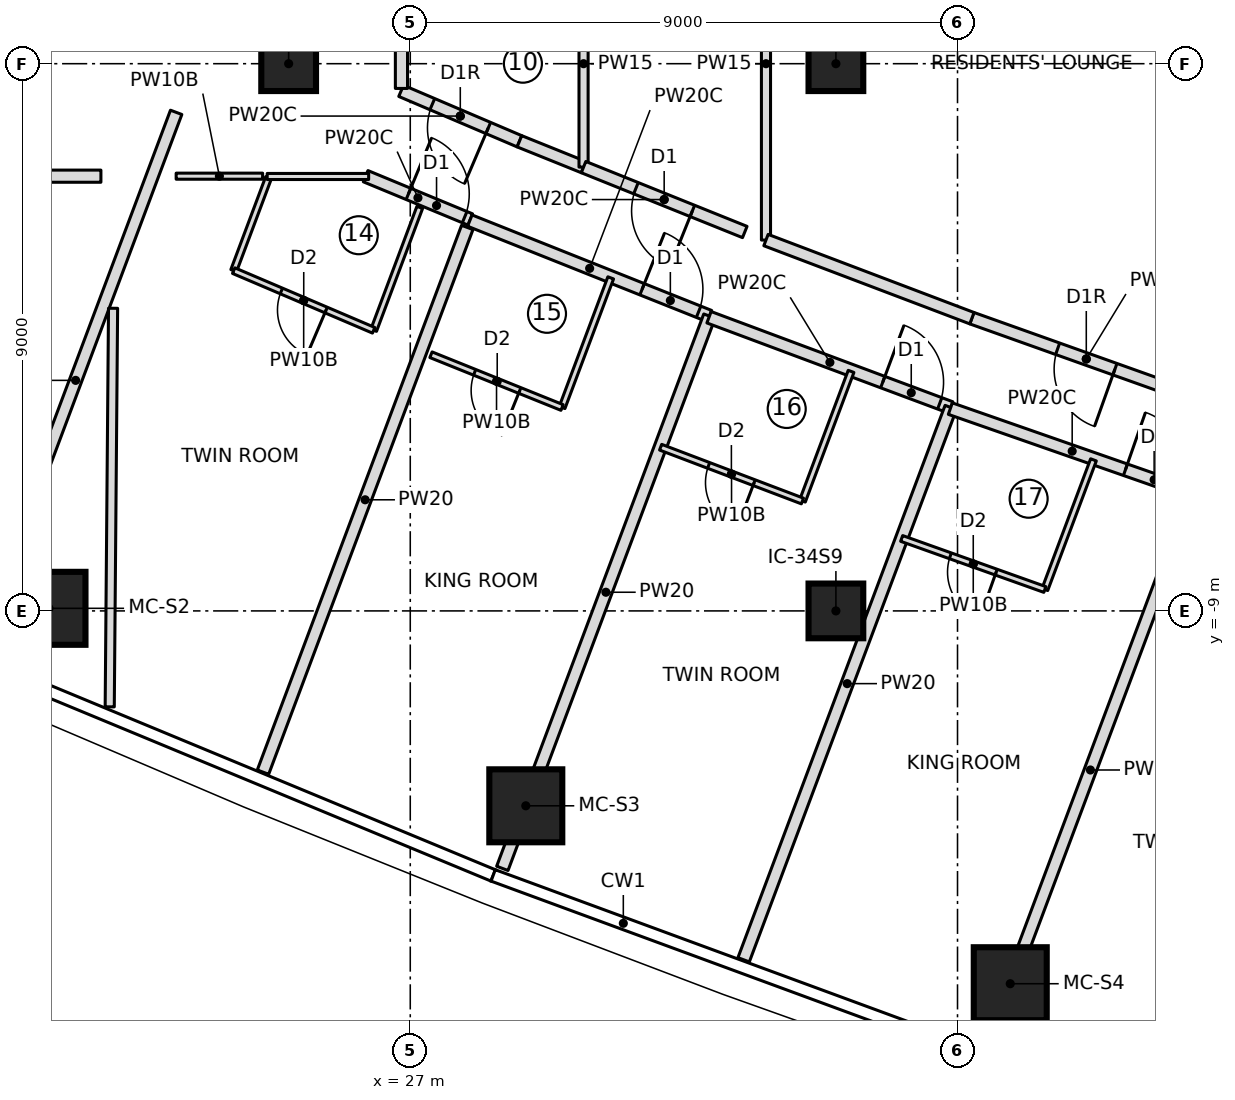
"""IFC4 building model, lengths in metres.
Left out: names, types, materials, properties, quantities, classifications, styles, units other than length and angle.
Written with IfcOpenShell. Run it as: python <this file> out.ifc"""

import sys

from ifc_helpers import new_model, si_unit, direction, frame, frame_2d, origin, origin_2d, place, context, subcontext, project, spatial, rectangle, extrude, element, fill, save


model = new_model("IFC4")
c1 = context("Model", 3, precision=1e-05, world=origin(), true_north=direction((0.0, 1.0)))
c2 = subcontext(c1, "Body", "Model", "MODEL_VIEW")
j1 = project(units=[si_unit("LENGTHUNIT", "METRE"), si_unit("PLANEANGLEUNIT", "RADIAN")], contexts=[c1])
p1 = place(None, origin())
s1 = spatial("IfcSite", under=j1, at=p1, CompositionType="ELEMENT")
p2 = place(p1, origin())
s2 = spatial("IfcBuilding", under=s1, at=p2, CompositionType="ELEMENT")
p3 = place(p2, frame((0.0, 0.0, 249.2)))
s3 = spatial("IfcBuildingStorey", under=s2, at=p3, CompositionType="ELEMENT", Elevation=249.2)
for number, where, z_axis, x_axis in (
    (1, (21.059, -8.958, 0.0), (0.0, 0.0, 1.0), (1.0, 0.0, 0.0)),
    (2, (28.9, -12.205, 0.0), (0.0, 0.0, 1.0), (1.0, 0.0, 0.0)),
    (3, (36.867, -15.132, 0.0), (0.0, 0.0, 1.0), (1.0, 0.0, 0.0)),
):
    element("IfcColumn", number, at=place(p3, frame(where, z_axis=z_axis, x_axis=x_axis)), inside=s3, PredefinedType="COLUMN", context=c2, shape_type="SweptSolid", body=[
        extrude(rectangle(XDim=1.2, YDim=1.2, at=origin_2d()), origin(), (0.0, 0.0, 1.0), 3.55),
    ])
for number, where, z_axis, x_axis in (
    (4, (25.0, 0.0, 0.0), (0.0, 0.0, 1.0), (1.0, 0.0, 0.0)),
    (5, (34.0, -9.0, 0.0), (0.0, 0.0, 1.0), (1.0, 0.0, 0.0)),
    (6, (34.0, 0.0, 0.0), (0.0, 0.0, 1.0), (1.0, 0.0, 0.0)),
):
    element("IfcColumn", number, at=place(p3, frame(where, z_axis=z_axis, x_axis=x_axis)), inside=s3, PredefinedType="COLUMN", context=c2, shape_type="SweptSolid", body=[
        extrude(rectangle(XDim=0.9, YDim=0.9, at=origin_2d()), origin(), (0.0, 0.0, 1.0), 3.55),
    ])
p4 = place(p3, frame((13.052, -1.85, 0.0), z_axis=(0.0, 0.0, 1.0), x_axis=(1.0, 0.0, 0.0)))
e7 = element("IfcWall", 7, at=p4, inside=s3, PredefinedType="PARTITIONING", context=c2, shape_type="SweptSolid", body=[
    extrude(rectangle(XDim=8.861, YDim=0.2, at=frame_2d((4.43, 0.0))), origin(), (0.0, 0.0, 1.0), 3.25),
])
p5 = place(p4, frame((3.93, 0.0, 0.0)))
e8 = element("IfcOpeningElement", 8, at=p5, cuts=e7, PredefinedType="OPENING", context=c2, shape_type="SweptSolid", body=[
    extrude(rectangle(XDim=1.0, YDim=2.1, at=frame_2d((0.5, 1.05))), frame((0.0, 0.11, 0.0), z_axis=(0.0, -1.0, 0.0), x_axis=(1.0, 0.0, 0.0)), (0.0, 0.0, 1.0), 0.22),
])
p6 = place(p3, frame((19.844, -9.616, 0.0), z_axis=(0.0, 0.0, 1.0), x_axis=(0.351123441588, 0.936329177569, 0.0)))
e9 = element("IfcWall", 9, at=p6, inside=s3, PredefinedType="PARTITIONING", context=c2, shape_type="SweptSolid", body=[
    extrude(rectangle(XDim=9.416, YDim=0.2, at=frame_2d((4.708, 0.0))), origin(), (0.0, 0.0, 1.0), 3.25),
])
p7 = place(p3, frame((26.266, -1.85, 0.0), z_axis=(0.0, 0.0, 1.0), x_axis=(0.924055156704, -0.382259162569, 0.0)))
e10 = element("IfcWall", 10, at=p7, inside=s3, PredefinedType="PARTITIONING", context=c2, shape_type="SweptSolid", body=[
    extrude(rectangle(XDim=1.862, YDim=0.2, at=frame_2d((0.931, 0.0))), origin(), (0.0, 0.0, 1.0), 3.25),
])
p8 = place(p7, frame((0.762, 0.0, 0.0)))
e11 = element("IfcOpeningElement", 11, at=p8, cuts=e10, PredefinedType="OPENING", context=c2, shape_type="SweptSolid", body=[
    extrude(rectangle(XDim=1.0, YDim=2.1, at=frame_2d((0.5, 1.05))), frame((0.0, 0.11, 0.0), z_axis=(0.0, -1.0, 0.0), x_axis=(1.0, 0.0, 0.0)), (0.0, 0.0, 1.0), 0.22),
])
p9 = place(p3, frame((24.096, -3.404, 0.0), z_axis=(0.0, 0.0, 1.0), x_axis=(0.351156192753, 0.936316895229, 0.0)))
e12 = element("IfcWall", 12, at=p9, inside=s3, PredefinedType="PARTITIONING", context=c2, shape_type="SweptSolid", body=[
    extrude(rectangle(XDim=1.634, YDim=0.1, at=frame_2d((0.817, 0.0))), origin(), (0.0, 0.0, 1.0), 3.25),
])
p10 = place(p3, frame((27.156, -2.363, 0.0), z_axis=(0.0, 0.0, 1.0), x_axis=(-0.351086267198, -0.936343117124, 0.0)))
e13 = element("IfcWall", 13, at=p10, inside=s3, PredefinedType="PARTITIONING", context=c2, shape_type="SweptSolid", body=[
    extrude(rectangle(XDim=2.159, YDim=0.1, at=frame_2d((1.08, 0.0))), origin(), (0.0, 0.0, 1.0), 3.25),
])
p11 = place(p3, frame((26.398, -4.385, 0.0), z_axis=(0.0, 0.0, 1.0), x_axis=(-0.919870178563, 0.392222965404, 0.0)))
e14 = element("IfcWall", 14, at=p11, inside=s3, PredefinedType="PARTITIONING", context=c2, shape_type="SweptSolid", body=[
    extrude(rectangle(XDim=2.502, YDim=0.1, at=frame_2d((1.251, 0.0))), origin(), (0.0, 0.0, 1.0), 3.25),
])
p12 = place(p11, frame((0.85, 0.0, 0.0)))
e15 = element("IfcOpeningElement", 15, at=p12, cuts=e14, PredefinedType="OPENING", context=c2, shape_type="SweptSolid", body=[
    extrude(rectangle(XDim=0.8, YDim=2.1, at=frame_2d((0.4, 1.05))), frame((0.0, 0.06, 0.0), z_axis=(0.0, -1.0, 0.0), x_axis=(1.0, 0.0, 0.0)), (0.0, 0.0, 1.0), 0.12),
])
p13 = place(p3, frame((24.578, -11.652, 0.0), z_axis=(0.0, 0.0, 1.0), x_axis=(0.351140219871, 0.936322885542, 0.0)))
e16 = element("IfcWall", 16, at=p13, inside=s3, PredefinedType="PARTITIONING", context=c2, shape_type="SweptSolid", body=[
    extrude(rectangle(XDim=9.568, YDim=0.2, at=frame_2d((4.784, 0.0))), origin(), (0.0, 0.0, 1.0), 3.25),
])
p14 = place(p3, frame((27.98, -2.581, 0.0), z_axis=(0.0, 0.0, 1.0), x_axis=(0.928920552813, -0.370279092795, 0.0)))
e17 = element("IfcWall", 17, at=p14, inside=s3, PredefinedType="PARTITIONING", context=c2, shape_type="SweptSolid", body=[
    extrude(rectangle(XDim=4.242, YDim=0.2, at=frame_2d((2.121, 0.0))), origin(), (0.0, 0.0, 1.0), 3.25),
])
p15 = place(p14, frame((3.05, 0.0, 0.0)))
e18 = element("IfcOpeningElement", 18, at=p15, cuts=e17, PredefinedType="OPENING", context=c2, shape_type="SweptSolid", body=[
    extrude(rectangle(XDim=1.0, YDim=2.1, at=frame_2d((0.5, 1.05))), frame((0.0, 0.11, 0.0), z_axis=(0.0, -1.0, 0.0), x_axis=(1.0, 0.0, 0.0)), (0.0, 0.0, 1.0), 0.22),
])
p16 = place(p3, frame((30.296, -3.522, 0.0), z_axis=(0.0, 0.0, 1.0), x_axis=(-0.351099944253, -0.936337988734, 0.0)))
e19 = element("IfcWall", 19, at=p16, inside=s3, PredefinedType="PARTITIONING", context=c2, shape_type="SweptSolid", body=[
    extrude(rectangle(XDim=2.277, YDim=0.1, at=frame_2d((1.139, 0.0))), origin(), (0.0, 0.0, 1.0), 3.25),
])
p17 = place(p3, frame((29.497, -5.655, 0.0), z_axis=(0.0, 0.0, 1.0), x_axis=(-0.927619412923, 0.373526739028, 0.0)))
e20 = element("IfcWall", 20, at=p17, inside=s3, PredefinedType="PARTITIONING", context=c2, shape_type="SweptSolid", body=[
    extrude(rectangle(XDim=2.324, YDim=0.1, at=frame_2d((1.162, 0.0))), origin(), (0.0, 0.0, 1.0), 3.25),
])
p18 = place(p17, frame((0.75, 0.0, 0.0)))
e21 = element("IfcOpeningElement", 21, at=p18, cuts=e20, PredefinedType="OPENING", context=c2, shape_type="SweptSolid", body=[
    extrude(rectangle(XDim=0.8, YDim=2.1, at=frame_2d((0.4, 1.05))), frame((0.0, 0.06, 0.0), z_axis=(0.0, -1.0, 0.0), x_axis=(1.0, 0.0, 0.0)), (0.0, 0.0, 1.0), 0.12),
])
p19 = place(p3, frame((28.514, -13.235, 0.0), z_axis=(0.0, 0.0, 1.0), x_axis=(0.351126199585, 0.936328143316, 0.0)))
e22 = element("IfcWall", 22, at=p19, inside=s3, PredefinedType="PARTITIONING", context=c2, shape_type="SweptSolid", body=[
    extrude(rectangle(XDim=9.701, YDim=0.2, at=frame_2d((4.851, 0.0))), origin(), (0.0, 0.0, 1.0), 3.25),
])
p20 = place(p3, frame((31.913, -4.17, 0.0), z_axis=(0.0, 0.0, 1.0), x_axis=(0.936848300955, -0.349735987565, 0.0)))
e23 = element("IfcWall", 23, at=p20, inside=s3, PredefinedType="PARTITIONING", context=c2, shape_type="SweptSolid", body=[
    extrude(rectangle(XDim=4.244, YDim=0.2, at=frame_2d((2.122, 0.0))), origin(), (0.0, 0.0, 1.0), 3.25),
])
p21 = place(p20, frame((3.05, 0.0, 0.0)))
e24 = element("IfcOpeningElement", 24, at=p21, cuts=e23, PredefinedType="OPENING", context=c2, shape_type="SweptSolid", body=[
    extrude(rectangle(XDim=1.0, YDim=2.1, at=frame_2d((0.5, 1.05))), frame((0.0, 0.11, 0.0), z_axis=(0.0, -1.0, 0.0), x_axis=(1.0, 0.0, 0.0)), (0.0, 0.0, 1.0), 0.22),
])
p22 = place(p3, frame((34.25, -5.061, 0.0), z_axis=(0.0, 0.0, 1.0), x_axis=(-0.351135191353, -0.936324771323, 0.0)))
e25 = element("IfcWall", 25, at=p22, inside=s3, PredefinedType="PARTITIONING", context=c2, shape_type="SweptSolid", body=[
    extrude(rectangle(XDim=2.277, YDim=0.1, at=frame_2d((1.139, 0.0))), origin(), (0.0, 0.0, 1.0), 3.25),
])
p23 = place(p3, frame((33.45, -7.193, 0.0), z_axis=(0.0, 0.0, 1.0), x_axis=(-0.93495051617, 0.354778145202, 0.0)))
e26 = element("IfcWall", 26, at=p23, inside=s3, PredefinedType="PARTITIONING", context=c2, shape_type="SweptSolid", body=[
    extrude(rectangle(XDim=2.495, YDim=0.1, at=frame_2d((1.247, 0.0))), origin(), (0.0, 0.0, 1.0), 3.25),
])
p24 = place(p23, frame((0.85, 0.0, 0.0)))
e27 = element("IfcOpeningElement", 27, at=p24, cuts=e26, PredefinedType="OPENING", context=c2, shape_type="SweptSolid", body=[
    extrude(rectangle(XDim=0.8, YDim=2.1, at=frame_2d((0.4, 1.05))), frame((0.0, 0.06, 0.0), z_axis=(0.0, -1.0, 0.0), x_axis=(1.0, 0.0, 0.0)), (0.0, 0.0, 1.0), 0.12),
])
p25 = place(p3, frame((32.483, -14.738, 0.0), z_axis=(0.0, 0.0, 1.0), x_axis=(0.351117925717, 0.936331246002, 0.0)))
e28 = element("IfcWall", 28, at=p25, inside=s3, PredefinedType="PARTITIONING", context=c2, shape_type="SweptSolid", body=[
    extrude(rectangle(XDim=9.701, YDim=0.2, at=frame_2d((4.851, 0.0))), origin(), (0.0, 0.0, 1.0), 3.25),
])
p26 = place(p3, frame((35.882, -5.673, 0.0), z_axis=(0.0, 0.0, 1.0), x_axis=(0.944107376821, -0.329638075823, 0.0)))
e29 = element("IfcWall", 29, at=p26, inside=s3, PredefinedType="PARTITIONING", context=c2, shape_type="SweptSolid", body=[
    extrude(rectangle(XDim=4.245, YDim=0.2, at=frame_2d((2.122, 0.0))), origin(), (0.0, 0.0, 1.0), 3.25),
])
p27 = place(p26, frame((3.05, 0.0, 0.0)))
e30 = element("IfcOpeningElement", 30, at=p27, cuts=e29, PredefinedType="OPENING", context=c2, shape_type="SweptSolid", body=[
    extrude(rectangle(XDim=1.0, YDim=2.1, at=frame_2d((0.5, 1.05))), frame((0.0, 0.11, 0.0), z_axis=(0.0, -1.0, 0.0), x_axis=(1.0, 0.0, 0.0)), (0.0, 0.0, 1.0), 0.22),
])
p28 = place(p3, frame((38.236, -6.516, 0.0), z_axis=(0.0, 0.0, 1.0), x_axis=(-0.351229183496, -0.936289517543, 0.0)))
e31 = element("IfcWall", 31, at=p28, inside=s3, PredefinedType="PARTITIONING", context=c2, shape_type="SweptSolid", body=[
    extrude(rectangle(XDim=2.277, YDim=0.1, at=frame_2d((1.139, 0.0))), origin(), (0.0, 0.0, 1.0), 3.25),
])
p29 = place(p3, frame((37.436, -8.648, 0.0), z_axis=(0.0, 0.0, 1.0), x_axis=(-0.941896455552, 0.335903359641, 0.0)))
e32 = element("IfcWall", 32, at=p29, inside=s3, PredefinedType="PARTITIONING", context=c2, shape_type="SweptSolid", body=[
    extrude(rectangle(XDim=2.5, YDim=0.1, at=frame_2d((1.25, 0.0))), origin(), (0.0, 0.0, 1.0), 3.25),
])
p30 = place(p29, frame((0.85, 0.0, 0.0)))
e33 = element("IfcOpeningElement", 33, at=p30, cuts=e32, PredefinedType="OPENING", context=c2, shape_type="SweptSolid", body=[
    extrude(rectangle(XDim=0.8, YDim=2.1, at=frame_2d((0.4, 1.05))), frame((0.0, 0.06, 0.0), z_axis=(0.0, -1.0, 0.0), x_axis=(1.0, 0.0, 0.0)), (0.0, 0.0, 1.0), 0.12),
])
p31 = place(p3, frame((36.481, -16.161, 0.0), z_axis=(0.0, 0.0, 1.0), x_axis=(0.35112895446, 0.936327110224, 0.0)))
e34 = element("IfcWall", 34, at=p31, inside=s3, PredefinedType="PARTITIONING", context=c2, shape_type="SweptSolid", body=[
    extrude(rectangle(XDim=9.706, YDim=0.2, at=frame_2d((4.853, 0.0))), origin(), (0.0, 0.0, 1.0), 3.25),
])
p32 = place(p3, frame((28.796, -1.276, 0.0), z_axis=(0.0, 0.0, 1.0), x_axis=(-0.91990756443, 0.392135273732, 0.0)))
e35 = element("IfcWall", 35, at=p32, inside=s3, PredefinedType="PARTITIONING", context=c2, shape_type="SweptSolid", body=[
    extrude(rectangle(XDim=2.115, YDim=0.2, at=frame_2d((1.058, 0.0))), origin(), (0.0, 0.0, 1.0), 3.25),
])
p33 = place(p32, frame((0.558, 0.0, 0.0)))
e36 = element("IfcOpeningElement", 36, at=p33, cuts=e35, PredefinedType="OPENING", context=c2, shape_type="SweptSolid", body=[
    extrude(rectangle(XDim=1.0, YDim=2.1, at=frame_2d((0.5, 1.05))), frame((0.0, 0.11, 0.0), z_axis=(0.0, -1.0, 0.0), x_axis=(1.0, 0.0, 0.0)), (0.0, 0.0, 1.0), 0.22),
])
p34 = place(p3, frame((29.85, -1.701, 0.0), z_axis=(0.0, 0.0, 1.0), x_axis=(-0.927629988441, 0.373500474624, 0.0)))
e37 = element("IfcWall", 37, at=p34, inside=s3, PredefinedType="PARTITIONING", context=c2, shape_type="SweptSolid", body=[
    extrude(rectangle(XDim=1.137, YDim=0.2, at=frame_2d((0.568, 0.0))), origin(), (0.0, 0.0, 1.0), 3.25),
])
p35 = place(p3, frame((29.85, -1.701, 0.0), z_axis=(0.0, 0.0, 1.0), x_axis=(0.0, 1.0, 0.0)))
e38 = element("IfcWall", 38, at=p35, inside=s3, PredefinedType="PARTITIONING", context=c2, shape_type="SweptSolid", body=[
    extrude(rectangle(XDim=3.401, YDim=0.15, at=frame_2d((1.701, 0.0))), origin(), (0.0, 0.0, 1.0), 3.25),
])
p36 = place(p3, frame((32.501, -2.768, 0.0), z_axis=(0.0, 0.0, 1.0), x_axis=(-0.927620073141, 0.373525099433, 0.0)))
e39 = element("IfcWall", 39, at=p36, inside=s3, PredefinedType="PARTITIONING", context=c2, shape_type="SweptSolid", body=[
    extrude(rectangle(XDim=2.858, YDim=0.2, at=frame_2d((1.429, 0.0))), origin(), (0.0, 0.0, 1.0), 3.25),
])
p37 = place(p36, frame((0.929, 0.0, 0.0)))
e40 = element("IfcOpeningElement", 40, at=p37, cuts=e39, PredefinedType="OPENING", context=c2, shape_type="SweptSolid", body=[
    extrude(rectangle(XDim=1.0, YDim=2.1, at=frame_2d((0.5, 1.05))), frame((0.0, 0.11, 0.0), z_axis=(0.0, -1.0, 0.0), x_axis=(1.0, 0.0, 0.0)), (0.0, 0.0, 1.0), 0.22),
])
p38 = place(p3, frame((32.85, -2.901, 0.0), z_axis=(0.0, 0.0, 1.0), x_axis=(0.0, 1.0, 0.0)))
e41 = element("IfcWall", 41, at=p38, inside=s3, PredefinedType="PARTITIONING", context=c2, shape_type="SweptSolid", body=[
    extrude(rectangle(XDim=5.801, YDim=0.15, at=frame_2d((2.901, 0.0))), origin(), (0.0, 0.0, 1.0), 3.25),
])
p39 = place(p3, frame((39.999, -5.527, 0.0), z_axis=(0.0, 0.0, 1.0), x_axis=(-0.941909090846, 0.335867927288, 0.0)))
e42 = element("IfcWall", 42, at=p39, inside=s3, PredefinedType="PARTITIONING", context=c2, shape_type="SweptSolid", body=[
    extrude(rectangle(XDim=3.995, YDim=0.2, at=frame_2d((1.998, 0.0))), origin(), (0.0, 0.0, 1.0), 3.25),
])
p40 = place(p39, frame((1.498, 0.0, 0.0)))
e43 = element("IfcOpeningElement", 43, at=p40, cuts=e42, PredefinedType="OPENING", context=c2, shape_type="SweptSolid", body=[
    extrude(rectangle(XDim=1.0, YDim=2.1, at=frame_2d((0.5, 1.05))), frame((0.0, 0.11, 0.0), z_axis=(0.0, -1.0, 0.0), x_axis=(1.0, 0.0, 0.0)), (0.0, 0.0, 1.0), 0.22),
])
p41 = place(p3, frame((36.236, -4.186, 0.0), z_axis=(0.0, 0.0, 1.0), x_axis=(-0.934953584606, 0.354770058816, 0.0)))
e44 = element("IfcWall", 44, at=p41, inside=s3, PredefinedType="PARTITIONING", context=c2, shape_type="SweptSolid", body=[
    extrude(rectangle(XDim=3.622, YDim=0.2, at=frame_2d((1.811, 0.0))), origin(), (0.0, 0.0, 1.0), 3.25),
])
p42 = place(p3, frame((22.112, -4.023, 0.0), z_axis=(0.0, 0.0, 1.0), x_axis=(-0.008379594055, -0.999964890585, 0.0)))
e45 = element("IfcWall", 45, at=p42, inside=s3, PredefinedType="PARTITIONING", context=c2, shape_type="SweptSolid", body=[
    extrude(rectangle(XDim=6.555, YDim=0.15, at=frame_2d((3.278, 0.0))), origin(), (0.0, 0.0, 1.0), 3.25),
])
p43 = place(p3, frame((24.647, -1.855, 0.0), z_axis=(0.0, 0.0, 1.0), x_axis=(1.0, 0.0, 0.0)))
e46 = element("IfcWall", 46, at=p43, inside=s3, PredefinedType="PARTITIONING", context=c2, shape_type="SweptSolid", body=[
    extrude(rectangle(XDim=1.669, YDim=0.1, at=frame_2d((0.834, 0.0))), origin(), (0.0, 0.0, 1.0), 3.25),
])
p44 = place(p3, frame((26.855, -0.407, 0.0), z_axis=(0.0, 0.0, 1.0), x_axis=(0.0, 1.0, 0.0)))
e47 = element("IfcWall", 47, at=p44, inside=s3, PredefinedType="PARTITIONING", context=c2, shape_type="SweptSolid", body=[
    extrude(rectangle(XDim=0.814, YDim=0.2, at=frame_2d((0.407, 0.0))), origin(), (0.0, 0.0, 1.0), 3.25),
])
p45 = place(p3, frame((24.572, -1.85, 0.0), z_axis=(0.0, 0.0, 1.0), x_axis=(-1.0, 0.0, 0.0)))
e48 = element("IfcWall", 48, at=p45, inside=s3, PredefinedType="PARTITIONING", context=c2, shape_type="SweptSolid", body=[
    extrude(rectangle(XDim=1.422, YDim=0.1, at=frame_2d((0.711, 0.0))), origin(), (0.0, 0.0, 1.0), 3.25),
])
p46 = place(p12, origin())
e49 = element("IfcDoor", 49, at=p46, inside=s3, OperationType="SINGLE_SWING_LEFT", PredefinedType="DOOR", context=c2, shape_type="SweptSolid", body=[
    extrude(rectangle(XDim=0.8, YDim=2.1, at=frame_2d((0.4, 1.05))), frame((0.0, 0.025, 0.0), z_axis=(0.0, -1.0, 0.0), x_axis=(1.0, 0.0, 0.0)), (0.0, 0.0, 1.0), 0.05),
])
fill(e15, e49)
p47 = place(p8, origin())
e50 = element("IfcDoor", 50, at=p47, inside=s3, OperationType="SINGLE_SWING_LEFT", PredefinedType="DOOR", context=c2, shape_type="SweptSolid", body=[
    extrude(rectangle(XDim=1.0, YDim=2.1, at=frame_2d((0.5, 1.05))), frame((0.0, 0.025, 0.0), z_axis=(0.0, -1.0, 0.0), x_axis=(1.0, 0.0, 0.0)), (0.0, 0.0, 1.0), 0.05),
])
fill(e11, e50)
p48 = place(p18, origin())
e51 = element("IfcDoor", 51, at=p48, inside=s3, OperationType="SINGLE_SWING_LEFT", PredefinedType="DOOR", context=c2, shape_type="SweptSolid", body=[
    extrude(rectangle(XDim=0.8, YDim=2.1, at=frame_2d((0.4, 1.05))), frame((0.0, 0.025, 0.0), z_axis=(0.0, -1.0, 0.0), x_axis=(1.0, 0.0, 0.0)), (0.0, 0.0, 1.0), 0.05),
])
fill(e21, e51)
p49 = place(p15, origin())
e52 = element("IfcDoor", 52, at=p49, inside=s3, OperationType="SINGLE_SWING_LEFT", PredefinedType="DOOR", context=c2, shape_type="SweptSolid", body=[
    extrude(rectangle(XDim=1.0, YDim=2.1, at=frame_2d((0.5, 1.05))), frame((0.0, 0.025, 0.0), z_axis=(0.0, -1.0, 0.0), x_axis=(1.0, 0.0, 0.0)), (0.0, 0.0, 1.0), 0.05),
])
fill(e18, e52)
p50 = place(p24, origin())
e53 = element("IfcDoor", 53, at=p50, inside=s3, OperationType="SINGLE_SWING_LEFT", PredefinedType="DOOR", context=c2, shape_type="SweptSolid", body=[
    extrude(rectangle(XDim=0.8, YDim=2.1, at=frame_2d((0.4, 1.05))), frame((0.0, 0.025, 0.0), z_axis=(0.0, -1.0, 0.0), x_axis=(1.0, 0.0, 0.0)), (0.0, 0.0, 1.0), 0.05),
])
fill(e27, e53)
p51 = place(p21, origin())
e54 = element("IfcDoor", 54, at=p51, inside=s3, OperationType="SINGLE_SWING_LEFT", PredefinedType="DOOR", context=c2, shape_type="SweptSolid", body=[
    extrude(rectangle(XDim=1.0, YDim=2.1, at=frame_2d((0.5, 1.05))), frame((0.0, 0.025, 0.0), z_axis=(0.0, -1.0, 0.0), x_axis=(1.0, 0.0, 0.0)), (0.0, 0.0, 1.0), 0.05),
])
fill(e24, e54)
p52 = place(p30, origin())
e55 = element("IfcDoor", 55, at=p52, inside=s3, OperationType="SINGLE_SWING_LEFT", PredefinedType="DOOR", context=c2, shape_type="SweptSolid", body=[
    extrude(rectangle(XDim=0.8, YDim=2.1, at=frame_2d((0.4, 1.05))), frame((0.0, 0.025, 0.0), z_axis=(0.0, -1.0, 0.0), x_axis=(1.0, 0.0, 0.0)), (0.0, 0.0, 1.0), 0.05),
])
fill(e33, e55)
p53 = place(p27, origin())
e56 = element("IfcDoor", 56, at=p53, inside=s3, OperationType="SINGLE_SWING_LEFT", PredefinedType="DOOR", context=c2, shape_type="SweptSolid", body=[
    extrude(rectangle(XDim=1.0, YDim=2.1, at=frame_2d((0.5, 1.05))), frame((0.0, 0.025, 0.0), z_axis=(0.0, -1.0, 0.0), x_axis=(1.0, 0.0, 0.0)), (0.0, 0.0, 1.0), 0.05),
])
fill(e30, e56)
p54 = place(p33, origin())
e57 = element("IfcDoor", 57, at=p54, inside=s3, OperationType="SINGLE_SWING_RIGHT", PredefinedType="DOOR", context=c2, shape_type="SweptSolid", body=[
    extrude(rectangle(XDim=1.0, YDim=2.1, at=frame_2d((0.5, 1.05))), frame((0.0, 0.025, 0.0), z_axis=(0.0, -1.0, 0.0), x_axis=(1.0, 0.0, 0.0)), (0.0, 0.0, 1.0), 0.05),
])
fill(e36, e57)
p55 = place(p37, origin())
e58 = element("IfcDoor", 58, at=p55, inside=s3, OperationType="SINGLE_SWING_LEFT", PredefinedType="DOOR", context=c2, shape_type="SweptSolid", body=[
    extrude(rectangle(XDim=1.0, YDim=2.1, at=frame_2d((0.5, 1.05))), frame((0.0, 0.025, 0.0), z_axis=(0.0, -1.0, 0.0), x_axis=(1.0, 0.0, 0.0)), (0.0, 0.0, 1.0), 0.05),
])
fill(e40, e58)
p56 = place(p40, origin())
e59 = element("IfcDoor", 59, at=p56, inside=s3, OperationType="SINGLE_SWING_RIGHT", PredefinedType="DOOR", context=c2, shape_type="SweptSolid", body=[
    extrude(rectangle(XDim=1.0, YDim=2.1, at=frame_2d((0.5, 1.05))), frame((0.0, 0.025, 0.0), z_axis=(0.0, -1.0, 0.0), x_axis=(1.0, 0.0, 0.0)), (0.0, 0.0, 1.0), 0.05),
])
fill(e43, e59)
save(model, sys.argv[1])
